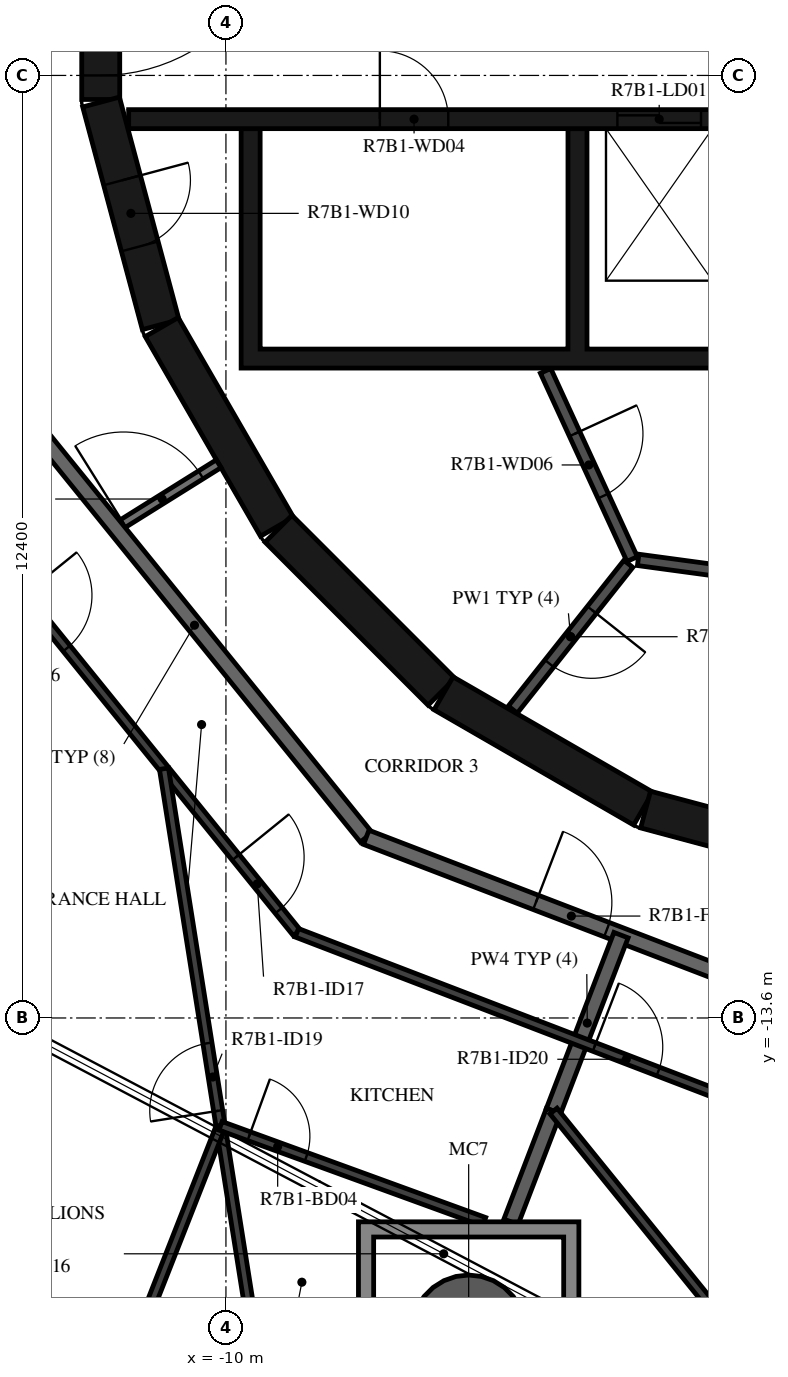
"""IFC4 building model, lengths in metres.
Left out: names, types, materials, properties, quantities, classifications, styles, units other than length and angle.
Written with IfcOpenShell. Run it as: python <this file> out.ifc"""

import sys

from ifc_helpers import new_model, si_unit, direction, frame, frame_2d, origin, origin_2d, place, context, subcontext, project, spatial, polyline, rectangle, hollow_circle, outline, extrude, element, fill, save


model = new_model("IFC4")
c1 = context("Model", 3, precision=1e-05, world=origin(), true_north=direction((0.0, 1.0)))
c2 = subcontext(c1, "Body", "Model", "MODEL_VIEW")
j1 = project(units=[si_unit("LENGTHUNIT", "METRE"), si_unit("PLANEANGLEUNIT", "RADIAN")], contexts=[c1])
p1 = place(None, origin())
s1 = spatial("IfcSite", under=j1, at=p1, CompositionType="ELEMENT")
p2 = place(p1, origin())
s2 = spatial("IfcBuilding", under=s1, at=p2, CompositionType="ELEMENT")
p3 = place(p2, frame((0.0, 0.0, 273.9)))
s3 = spatial("IfcBuildingStorey", under=s2, at=p3, CompositionType="ELEMENT", Elevation=273.9)
p4 = place(p3, frame((-6.807, -17.732, -0.38), z_axis=(0.0, 0.0, 1.0), x_axis=(1.0, 0.0, 0.0)))
e1 = element("IfcColumn", 1, at=p4, inside=s3, PredefinedType="COLUMN", context=c2, shape_type="SweptSolid", body=[
    extrude(hollow_circle(Radius=0.75, WallThickness=0.035, at=origin_2d()), origin(), (0.0, 0.0, 1.0), 3.5),
])
p5 = place(p3, frame((-11.647, 1.516, 0.0), z_axis=(0.0, 0.0, 1.0), x_axis=(0.0, -1.0, 0.0)))
e2 = element("IfcWall", 2, at=p5, inside=s3, PredefinedType="SHEAR", context=c2, shape_type="SweptSolid", body=[
    extrude(rectangle(XDim=3.033, YDim=0.5, at=frame_2d((1.516, 0.0))), origin(), (0.0, 0.0, 1.0), 3.12),
])
p6 = place(p5, frame((0.316, 0.0, 0.0)))
e3 = element("IfcOpeningElement", 3, at=p6, cuts=e2, PredefinedType="OPENING", context=c2, shape_type="SweptSolid", body=[
    extrude(rectangle(XDim=2.4, YDim=2.1, at=frame_2d((1.2, 1.05))), frame((0.0, 0.26, 0.0), z_axis=(0.0, -1.0, 0.0), x_axis=(1.0, 0.0, 0.0)), (0.0, 0.0, 1.0), 0.52),
])
p7 = place(p3, frame((-11.643, -1.55, 0.0), z_axis=(0.0, 0.0, 1.0), x_axis=(0.258734743916, -0.965948410781, 0.0)))
e4 = element("IfcWall", 4, at=p7, inside=s3, PredefinedType="SHEAR", context=c2, shape_type="SweptSolid", body=[
    extrude(rectangle(XDim=3.033, YDim=0.5, at=frame_2d((1.516, 0.0))), origin(), (0.0, 0.0, 1.0), 3.12),
])
p8 = place(p7, frame((1.066, 0.0, 0.0)))
e5 = element("IfcOpeningElement", 5, at=p8, cuts=e4, PredefinedType="OPENING", context=c2, shape_type="SweptSolid", body=[
    extrude(rectangle(XDim=0.9, YDim=2.1, at=frame_2d((0.45, 1.05))), frame((0.0, 0.26, 0.0), z_axis=(0.0, -1.0, 0.0), x_axis=(1.0, 0.0, 0.0)), (0.0, 0.0, 1.0), 0.52),
])
p9 = place(p3, frame((-10.845, -4.51, 0.0), z_axis=(0.0, 0.0, 1.0), x_axis=(0.500087131594, -0.865975092491, 0.0)))
e6 = element("IfcWall", 6, at=p9, inside=s3, PredefinedType="SHEAR", context=c2, shape_type="SweptSolid", body=[
    extrude(rectangle(XDim=3.033, YDim=0.5, at=frame_2d((1.516, 0.0))), origin(), (0.0, 0.0, 1.0), 3.12),
])
p10 = place(p3, frame((-9.308, -7.164, 0.0), z_axis=(0.0, 0.0, 1.0), x_axis=(0.707106781187, -0.707106781187, 0.0)))
e7 = element("IfcWall", 7, at=p10, inside=s3, PredefinedType="SHEAR", context=c2, shape_type="SweptSolid", body=[
    extrude(rectangle(XDim=3.032, YDim=0.5, at=frame_2d((1.516, 0.0))), origin(), (0.0, 0.0, 1.0), 3.12),
])
for number, where, z_axis, x_axis in (
    (8, (-7.137, -9.329, 0.0), (0.0, 0.0, 1.0), (0.866, -0.5, 0.0)),
    (9, (-4.479, -10.858, 0.0), (0.0, 0.0, 1.0), (0.966, -0.259, 0.0)),
):
    element("IfcWall", number, at=place(p3, frame(where, z_axis=z_axis, x_axis=x_axis)), inside=s3, PredefinedType="SHEAR", context=c2, shape_type="SweptSolid", body=[
        extrude(rectangle(XDim=3.033, YDim=0.5, at=frame_2d((1.516, 0.0))), origin(), (0.0, 0.0, 1.0), 3.12),
    ])
p11 = place(p3, origin())
e10 = element("IfcWall", 10, at=p11, inside=s3, PredefinedType="SHEAR", context=c2, shape_type="SweptSolid", body=[
    extrude(outline(polyline([(9.8, -5.05), (9.8, -4.8), (9.8, -1.9), (9.55, -1.9), (9.55, -4.8), (7.65, -4.8), (7.65, -1.9), (7.4, -1.9), (7.4, -4.8), (5.5, -4.8), (5.5, -1.9), (5.25, -1.9), (5.25, -4.8), (3.35, -4.8), (3.35, -1.9), (3.1, -1.9), (3.1, -4.8), (1.2, -4.8), (1.2, -1.9), (0.95, -1.9), (0.95, -4.8), (-0.95, -4.8), (-0.95, -1.9), (-1.2, -1.9), (-1.2, -4.8), (-3.1, -4.8), (-3.1, -1.9), (-3.35, -1.9), (-3.35, -4.8), (-5.25, -4.8), (-5.25, -1.9), (-5.5, -1.9), (-5.5, -4.8), (-9.55, -4.8), (-9.55, -1.9), (-9.8, -1.9), (-9.8, -4.8), (-9.8, -5.05), (9.8, -5.05)])), origin(), (0.0, 0.0, 1.0), 3.12),
])
p12 = place(p3, frame((-11.28, -1.775, 0.0), z_axis=(0.0, 0.0, 1.0), x_axis=(1.0, 0.0, 0.0)))
e11 = element("IfcWall", 11, at=p12, inside=s3, PredefinedType="SHEAR", context=c2, shape_type="SweptSolid", body=[
    extrude(rectangle(XDim=14.38, YDim=0.25, at=frame_2d((7.19, 0.0))), origin(), (0.0, 0.0, 1.0), 3.12),
])
p13 = place(p12, frame((6.43, 0.0, 0.0)))
e12 = element("IfcOpeningElement", 12, at=p13, cuts=e11, PredefinedType="OPENING", context=c2, shape_type="SweptSolid", body=[
    extrude(rectangle(XDim=1.1, YDim=2.1, at=frame_2d((0.55, 1.05))), frame((0.0, 0.135, 0.0), z_axis=(0.0, -1.0, 0.0), x_axis=(1.0, 0.0, 0.0)), (0.0, 0.0, 1.0), 0.27),
])
p14 = place(p12, frame((8.58, 0.0, 0.0)))
e13 = element("IfcOpeningElement", 13, at=p14, cuts=e11, PredefinedType="OPENING", context=c2, shape_type="SweptSolid", body=[
    extrude(rectangle(XDim=1.1, YDim=2.1, at=frame_2d((0.55, 1.05))), frame((0.0, 0.135, 0.0), z_axis=(0.0, -1.0, 0.0), x_axis=(1.0, 0.0, 0.0)), (0.0, 0.0, 1.0), 0.27),
])
p15 = place(p12, frame((10.73, 0.0, 0.0)))
e14 = element("IfcOpeningElement", 14, at=p15, cuts=e11, PredefinedType="OPENING", context=c2, shape_type="SweptSolid", body=[
    extrude(rectangle(XDim=1.1, YDim=2.1, at=frame_2d((0.55, 1.05))), frame((0.0, 0.135, 0.0), z_axis=(0.0, -1.0, 0.0), x_axis=(1.0, 0.0, 0.0)), (0.0, 0.0, 1.0), 0.27),
])
p16 = place(p12, frame((3.305, 0.0, 0.0)))
e15 = element("IfcOpeningElement", 15, at=p16, cuts=e11, PredefinedType="OPENING", context=c2, shape_type="SweptSolid", body=[
    extrude(rectangle(XDim=0.9, YDim=2.1, at=frame_2d((0.45, 1.05))), frame((0.0, 0.135, 0.0), z_axis=(0.0, -1.0, 0.0), x_axis=(1.0, 0.0, 0.0)), (0.0, 0.0, 1.0), 0.27),
])
p17 = place(p12, frame((12.98, 0.0, 0.0)))
e16 = element("IfcOpeningElement", 16, at=p17, cuts=e11, PredefinedType="OPENING", context=c2, shape_type="SweptSolid", body=[
    extrude(rectangle(XDim=0.9, YDim=2.1, at=frame_2d((0.45, 1.05))), frame((0.0, 0.135, 0.0), z_axis=(0.0, -1.0, 0.0), x_axis=(1.0, 0.0, 0.0)), (0.0, 0.0, 1.0), 0.27),
])
p18 = place(p3, frame((-5.795, -5.086, 0.0), z_axis=(0.0, 0.0, 1.0), x_axis=(0.417887867606, -0.908498613157, 0.0)))
e17 = element("IfcWall", 17, at=p18, inside=s3, PredefinedType="PARTITIONING", context=c2, shape_type="SweptSolid", body=[
    extrude(rectangle(XDim=2.726, YDim=0.15, at=frame_2d((1.363, 0.0))), origin(), (0.0, 0.0, 1.0), 3.12),
])
p19 = place(p18, frame((0.913, 0.0, 0.0)))
e18 = element("IfcOpeningElement", 18, at=p19, cuts=e17, PredefinedType="OPENING", context=c2, shape_type="SweptSolid", body=[
    extrude(rectangle(XDim=0.9, YDim=2.1, at=frame_2d((0.45, 1.05))), frame((0.0, 0.085, 0.0), z_axis=(0.0, -1.0, 0.0), x_axis=(1.0, 0.0, 0.0)), (0.0, 0.0, 1.0), 0.17),
])
p20 = place(p3, frame((-4.706, -7.625, 0.0), z_axis=(0.0, 0.0, 1.0), x_axis=(-0.621392599334, -0.783499353856, 0.0)))
e19 = element("IfcWall", 19, at=p20, inside=s3, PredefinedType="PARTITIONING", context=c2, shape_type="SweptSolid", body=[
    extrude(rectangle(XDim=2.447, YDim=0.15, at=frame_2d((1.224, 0.0))), origin(), (0.0, 0.0, 1.0), 3.12),
])
p21 = place(p20, frame((0.774, 0.0, 0.0)))
e20 = element("IfcOpeningElement", 20, at=p21, cuts=e19, PredefinedType="OPENING", context=c2, shape_type="SweptSolid", body=[
    extrude(rectangle(XDim=0.9, YDim=2.1, at=frame_2d((0.45, 1.05))), frame((0.0, 0.085, 0.0), z_axis=(0.0, -1.0, 0.0), x_axis=(1.0, 0.0, 0.0)), (0.0, 0.0, 1.0), 0.17),
])
p22 = place(p3, frame((-2.42, -7.865, 0.0), z_axis=(0.0, 0.0, 1.0), x_axis=(-0.990972299108, 0.134066783362, 0.0)))
e21 = element("IfcWall", 21, at=p22, inside=s3, PredefinedType="PARTITIONING", context=c2, shape_type="SweptSolid", body=[
    extrude(rectangle(XDim=2.176, YDim=0.15, at=frame_2d((1.088, 0.0))), origin(), (0.0, 0.0, 1.0), 3.12),
])
p23 = place(p3, frame((-11.449, -7.154, 0.0), z_axis=(0.0, 0.0, 1.0), x_axis=(0.848067047543, 0.529888934468, 0.0)))
e22 = element("IfcWall", 22, at=p23, inside=s3, PredefinedType="PARTITIONING", context=c2, shape_type="SweptSolid", body=[
    extrude(rectangle(XDim=1.596, YDim=0.12, at=frame_2d((0.798, 0.0))), origin(), (0.0, 0.0, 1.0), 3.12),
])
p24 = place(p23, frame((0.12, 0.0, 0.0)))
e23 = element("IfcOpeningElement", 23, at=p24, cuts=e22, PredefinedType="OPENING", context=c2, shape_type="SweptSolid", body=[
    extrude(rectangle(XDim=1.2, YDim=2.1, at=frame_2d((0.6, 1.05))), frame((0.0, 0.07, 0.0), z_axis=(0.0, -1.0, 0.0), x_axis=(1.0, 0.0, 0.0)), (0.0, 0.0, 1.0), 0.14),
])
p25 = place(p3, frame((-12.673, -5.643, 0.0), z_axis=(0.0, 0.0, 1.0), x_axis=(0.629302871585, -0.777160148113, 0.0)))
e24 = element("IfcWall", 24, at=p25, inside=s3, PredefinedType="STANDARD", context=c2, shape_type="SweptSolid", body=[
    extrude(rectangle(XDim=7.181, YDim=0.2, at=frame_2d((3.59, 0.0))), origin(), (0.0, 0.0, 1.0), 3.12),
])
p26 = place(p3, frame((-8.154, -11.223, 0.0), z_axis=(0.0, 0.0, 1.0), x_axis=(0.93359073609, -0.358341090983, 0.0)))
e25 = element("IfcWall", 25, at=p26, inside=s3, PredefinedType="STANDARD", context=c2, shape_type="SweptSolid", body=[
    extrude(rectangle(XDim=7.181, YDim=0.2, at=frame_2d((3.59, 0.0))), origin(), (0.0, 0.0, 1.0), 3.12),
])
p27 = place(p26, frame((2.39, 0.0, 0.0)))
e26 = element("IfcOpeningElement", 26, at=p27, cuts=e25, PredefinedType="OPENING", context=c2, shape_type="SweptSolid", body=[
    extrude(rectangle(XDim=1.0, YDim=2.1, at=frame_2d((0.5, 1.05))), frame((0.0, 0.11, 0.0), z_axis=(0.0, -1.0, 0.0), x_axis=(1.0, 0.0, 0.0)), (0.0, 0.0, 1.0), 0.22),
])
p28 = place(p3, frame((-5.69, -14.824, 0.0), z_axis=(0.0, 0.0, 1.0), x_axis=(0.358345342952, 0.933589104041, 0.0)))
e27 = element("IfcWall", 27, at=p28, inside=s3, PredefinedType="STANDARD", context=c2, shape_type="SweptSolid", body=[
    extrude(rectangle(XDim=2.479, YDim=0.2, at=frame_2d((1.239, 0.0))), origin(), (0.0, 0.0, 1.0), 3.12),
])
p29 = place(p3, frame((-6.25, -16.282, 0.0), z_axis=(0.0, 0.0, 1.0), x_axis=(0.358360842469, 0.933583154617, 0.0)))
e28 = element("IfcWall", 28, at=p29, inside=s3, PredefinedType="STANDARD", context=c2, shape_type="SweptSolid", body=[
    extrude(rectangle(XDim=1.562, YDim=0.2, at=frame_2d((0.781, 0.0))), origin(), (0.0, 0.0, 1.0), 3.12),
])
p30 = place(p3, frame((-12.788, -7.884, 0.0), z_axis=(0.0, 0.0, 1.0), x_axis=(0.6293312414, -0.777137174891, 0.0)))
e29 = element("IfcWall", 29, at=p30, inside=s3, PredefinedType="PARTITIONING", context=c2, shape_type="SweptSolid", body=[
    extrude(rectangle(XDim=5.913, YDim=0.12, at=frame_2d((2.957, 0.0))), origin(), (0.0, 0.0, 1.0), 3.12),
])
p31 = place(p30, frame((0.2, 0.0, 0.0)))
e30 = element("IfcOpeningElement", 30, at=p31, cuts=e29, PredefinedType="OPENING", context=c2, shape_type="SweptSolid", body=[
    extrude(rectangle(XDim=0.9, YDim=2.1, at=frame_2d((0.45, 1.05))), frame((0.0, 0.07, 0.0), z_axis=(0.0, -1.0, 0.0), x_axis=(1.0, 0.0, 0.0)), (0.0, 0.0, 1.0), 0.14),
])
p32 = place(p30, frame((4.635, 0.0, 0.0)))
e31 = element("IfcOpeningElement", 31, at=p32, cuts=e29, PredefinedType="OPENING", context=c2, shape_type="SweptSolid", body=[
    extrude(rectangle(XDim=0.9, YDim=2.1, at=frame_2d((0.45, 1.05))), frame((0.0, 0.07, 0.0), z_axis=(0.0, -1.0, 0.0), x_axis=(1.0, 0.0, 0.0)), (0.0, 0.0, 1.0), 0.14),
])
p33 = place(p3, frame((-9.067, -12.479, 0.0), z_axis=(0.0, 0.0, 1.0), x_axis=(0.933579449035, -0.358370495911, 0.0)))
e32 = element("IfcWall", 32, at=p33, inside=s3, PredefinedType="PARTITIONING", context=c2, shape_type="SweptSolid", body=[
    extrude(rectangle(XDim=7.985, YDim=0.12, at=frame_2d((3.992, 0.0))), origin(), (0.0, 0.0, 1.0), 3.12),
])
p34 = place(p33, frame((4.192, 0.0, 0.0)))
e33 = element("IfcOpeningElement", 33, at=p34, cuts=e32, PredefinedType="OPENING", context=c2, shape_type="SweptSolid", body=[
    extrude(rectangle(XDim=0.9, YDim=2.1, at=frame_2d((0.45, 1.05))), frame((0.0, 0.07, 0.0), z_axis=(0.0, -1.0, 0.0), x_axis=(1.0, 0.0, 0.0)), (0.0, 0.0, 1.0), 0.14),
])
p35 = place(p3, frame((-9.619, -17.871, 0.0), z_axis=(0.0, 0.0, 1.0), x_axis=(-0.156433255633, 0.987688532146, 0.0)))
e34 = element("IfcWall", 34, at=p35, inside=s3, PredefinedType="PARTITIONING", context=c2, shape_type="SweptSolid", body=[
    extrude(rectangle(XDim=7.644, YDim=0.12, at=frame_2d((3.822, 0.0))), origin(), (0.0, 0.0, 1.0), 3.12),
])
p36 = place(p35, frame((3.087, 0.0, 0.0)))
e35 = element("IfcOpeningElement", 35, at=p36, cuts=e34, PredefinedType="OPENING", context=c2, shape_type="SweptSolid", body=[
    extrude(rectangle(XDim=0.9, YDim=2.1, at=frame_2d((0.45, 1.05))), frame((0.0, 0.07, 0.0), z_axis=(0.0, -1.0, 0.0), x_axis=(1.0, 0.0, 0.0)), (0.0, 0.0, 1.0), 0.14),
])
p37 = place(p3, frame((-13.067, -22.658, 0.0), z_axis=(0.0, 0.0, 1.0), x_axis=(0.365785999331, 0.930698986082, 0.0)))
e36 = element("IfcWall", 36, at=p37, inside=s3, PredefinedType="PARTITIONING", context=c2, shape_type="SweptSolid", body=[
    extrude(rectangle(XDim=8.196, YDim=0.12, at=frame_2d((4.098, 0.0))), origin(), (0.0, 0.0, 1.0), 3.12),
])
p38 = place(p37, frame((0.5, 0.0, 0.0)))
e37 = element("IfcOpeningElement", 37, at=p38, cuts=e36, PredefinedType="OPENING", context=c2, shape_type="SweptSolid", body=[
    extrude(rectangle(XDim=0.9, YDim=2.1, at=frame_2d((0.45, 1.05))), frame((0.0, 0.07, 0.0), z_axis=(0.0, -1.0, 0.0), x_axis=(1.0, 0.0, 0.0)), (0.0, 0.0, 1.0), 0.14),
])
p39 = place(p3, frame((-10.071, -15.019, 0.0), z_axis=(0.0, 0.0, 1.0), x_axis=(0.939648507355, -0.34214131967, 0.0)))
e38 = element("IfcWall", 38, at=p39, inside=s3, PredefinedType="PARTITIONING", context=c2, shape_type="SweptSolid", body=[
    extrude(rectangle(XDim=3.691, YDim=0.12, at=frame_2d((1.846, 0.0))), origin(), (0.0, 0.0, 1.0), 3.12),
])
p40 = place(p39, frame((0.4, 0.0, 0.0)))
e39 = element("IfcOpeningElement", 39, at=p40, cuts=e38, PredefinedType="OPENING", context=c2, shape_type="SweptSolid", body=[
    extrude(rectangle(XDim=0.8, YDim=2.1, at=frame_2d((0.4, 1.05))), frame((0.0, 0.07, 0.0), z_axis=(0.0, -1.0, 0.0), x_axis=(1.0, 0.0, 0.0)), (0.0, 0.0, 1.0), 0.14),
])
p41 = place(p3, frame((-4.809, -19.717, 0.0), z_axis=(0.0, 0.0, 1.0), x_axis=(0.777140730041, 0.629326851255, 0.0)))
e40 = element("IfcWall", 40, at=p41, inside=s3, PredefinedType="PARTITIONING", context=c2, shape_type="SweptSolid", body=[
    extrude(rectangle(XDim=7.644, YDim=0.12, at=frame_2d((3.822, 0.0))), origin(), (0.0, 0.0, 1.0), 3.12),
])
p42 = place(p41, frame((2.594, 0.0, 0.0)))
e41 = element("IfcOpeningElement", 41, at=p42, cuts=e40, PredefinedType="OPENING", context=c2, shape_type="SweptSolid", body=[
    extrude(rectangle(XDim=0.9, YDim=2.1, at=frame_2d((0.45, 1.05))), frame((0.0, 0.07, 0.0), z_axis=(0.0, -1.0, 0.0), x_axis=(1.0, 0.0, 0.0)), (0.0, 0.0, 1.0), 0.14),
])
p43 = place(p41, frame((0.3, 0.0, 0.0)))
e42 = element("IfcOpeningElement", 42, at=p43, cuts=e40, PredefinedType="OPENING", context=c2, shape_type="SweptSolid", body=[
    extrude(rectangle(XDim=0.8, YDim=2.1, at=frame_2d((0.4, 1.05))), frame((0.0, 0.07, 0.0), z_axis=(0.0, -1.0, 0.0), x_axis=(1.0, 0.0, 0.0)), (0.0, 0.0, 1.0), 0.14),
])
p44 = place(p41, frame((4.319, 0.0, 0.0)))
e43 = element("IfcOpeningElement", 43, at=p44, cuts=e40, PredefinedType="OPENING", context=c2, shape_type="SweptSolid", body=[
    extrude(rectangle(XDim=0.9, YDim=2.1, at=frame_2d((0.45, 1.05))), frame((0.0, 0.07, 0.0), z_axis=(0.0, -1.0, 0.0), x_axis=(1.0, 0.0, 0.0)), (0.0, 0.0, 1.0), 0.14),
])
p45 = place(p3, frame((-2.948, -18.21, 0.0), z_axis=(0.0, 0.0, 1.0), x_axis=(-0.629330389268, 0.777137864953, 0.0)))
e44 = element("IfcWall", 44, at=p45, inside=s3, PredefinedType="PARTITIONING", context=c2, shape_type="SweptSolid", body=[
    extrude(rectangle(XDim=4.357, YDim=0.12, at=frame_2d((2.179, 0.0))), origin(), (0.0, 0.0, 1.0), 3.12),
])
p46 = place(p3, origin())
e45 = element("IfcWall", 45, at=p46, inside=s3, PredefinedType="STANDARD", context=c2, shape_type="SweptSolid", body=[
    extrude(outline(polyline([(-5.357, -16.282), (-5.357, -19.182), (-8.257, -19.182), (-8.257, -16.282), (-5.357, -16.282)]), holes=[polyline([(-8.057, -18.982), (-5.557, -18.982), (-5.557, -16.482), (-8.057, -16.482), (-8.057, -18.982)])]), origin(), (0.0, 0.0, 1.0), 3.12),
])
p47 = place(p6, origin())
e46 = element("IfcDoor", 46, at=p47, inside=s3, OperationType="DOUBLE_DOOR_SINGLE_SWING", PredefinedType="DOOR", context=c2, shape_type="SweptSolid", body=[
    extrude(rectangle(XDim=2.4, YDim=2.1, at=frame_2d((1.2, 1.05))), frame((0.0, 0.025, 0.0), z_axis=(0.0, -1.0, 0.0), x_axis=(1.0, 0.0, 0.0)), (0.0, 0.0, 1.0), 0.05),
])
fill(e3, e46)
p48 = place(p13, origin())
e47 = element("IfcDoor", 47, at=p48, inside=s3, OperationType="DOUBLE_DOOR_SLIDING", PredefinedType="DOOR", context=c2, shape_type="SweptSolid", body=[
    extrude(rectangle(XDim=1.1, YDim=2.1, at=frame_2d((0.55, 1.05))), frame((0.0, 0.025, 0.0), z_axis=(0.0, -1.0, 0.0), x_axis=(1.0, 0.0, 0.0)), (0.0, 0.0, 1.0), 0.05),
])
fill(e12, e47)
p49 = place(p16, origin())
e48 = element("IfcDoor", 48, at=p49, inside=s3, OperationType="SINGLE_SWING_RIGHT", PredefinedType="DOOR", context=c2, shape_type="SweptSolid", body=[
    extrude(rectangle(XDim=0.9, YDim=2.1, at=frame_2d((0.45, 1.05))), frame((0.0, 0.025, 0.0), z_axis=(0.0, -1.0, 0.0), x_axis=(1.0, 0.0, 0.0)), (0.0, 0.0, 1.0), 0.05),
])
fill(e15, e48)
p50 = place(p19, origin())
e49 = element("IfcDoor", 49, at=p50, inside=s3, OperationType="SINGLE_SWING_RIGHT", PredefinedType="DOOR", context=c2, shape_type="SweptSolid", body=[
    extrude(rectangle(XDim=0.9, YDim=2.1, at=frame_2d((0.45, 1.05))), frame((0.0, 0.025, 0.0), z_axis=(0.0, -1.0, 0.0), x_axis=(1.0, 0.0, 0.0)), (0.0, 0.0, 1.0), 0.05),
])
fill(e18, e49)
p51 = place(p21, origin())
e50 = element("IfcDoor", 50, at=p51, inside=s3, OperationType="SINGLE_SWING_LEFT", PredefinedType="DOOR", context=c2, shape_type="SweptSolid", body=[
    extrude(rectangle(XDim=0.9, YDim=2.1, at=frame_2d((0.45, 1.05))), frame((0.0, 0.025, 0.0), z_axis=(0.0, -1.0, 0.0), x_axis=(1.0, 0.0, 0.0)), (0.0, 0.0, 1.0), 0.05),
])
fill(e20, e50)
p52 = place(p8, origin())
e51 = element("IfcDoor", 51, at=p52, inside=s3, OperationType="SINGLE_SWING_RIGHT", PredefinedType="DOOR", context=c2, shape_type="SweptSolid", body=[
    extrude(rectangle(XDim=0.9, YDim=2.1, at=frame_2d((0.45, 1.05))), frame((0.0, 0.025, 0.0), z_axis=(0.0, -1.0, 0.0), x_axis=(1.0, 0.0, 0.0)), (0.0, 0.0, 1.0), 0.05),
])
fill(e5, e51)
p53 = place(p27, origin())
e52 = element("IfcDoor", 52, at=p53, inside=s3, OperationType="SINGLE_SWING_RIGHT", PredefinedType="DOOR", context=c2, shape_type="SweptSolid", body=[
    extrude(rectangle(XDim=1.0, YDim=2.1, at=frame_2d((0.5, 1.05))), frame((0.0, 0.025, 0.0), z_axis=(0.0, -1.0, 0.0), x_axis=(1.0, 0.0, 0.0)), (0.0, 0.0, 1.0), 0.05),
])
fill(e26, e52)
p54 = place(p31, origin())
e53 = element("IfcDoor", 53, at=p54, inside=s3, OperationType="SINGLE_SWING_RIGHT", PredefinedType="DOOR", context=c2, shape_type="SweptSolid", body=[
    extrude(rectangle(XDim=0.9, YDim=2.1, at=frame_2d((0.45, 1.05))), frame((0.0, 0.025, 0.0), z_axis=(0.0, -1.0, 0.0), x_axis=(1.0, 0.0, 0.0)), (0.0, 0.0, 1.0), 0.05),
])
fill(e30, e53)
p55 = place(p32, origin())
e54 = element("IfcDoor", 54, at=p55, inside=s3, OperationType="SINGLE_SWING_RIGHT", PredefinedType="DOOR", context=c2, shape_type="SweptSolid", body=[
    extrude(rectangle(XDim=0.9, YDim=2.1, at=frame_2d((0.45, 1.05))), frame((0.0, 0.025, 0.0), z_axis=(0.0, -1.0, 0.0), x_axis=(1.0, 0.0, 0.0)), (0.0, 0.0, 1.0), 0.05),
])
fill(e31, e54)
p56 = place(p40, origin())
e55 = element("IfcDoor", 55, at=p56, inside=s3, OperationType="SINGLE_SWING_RIGHT", PredefinedType="DOOR", context=c2, shape_type="SweptSolid", body=[
    extrude(rectangle(XDim=0.8, YDim=2.1, at=frame_2d((0.4, 1.05))), frame((0.0, 0.025, 0.0), z_axis=(0.0, -1.0, 0.0), x_axis=(1.0, 0.0, 0.0)), (0.0, 0.0, 1.0), 0.05),
])
fill(e39, e55)
p57 = place(p36, origin())
e56 = element("IfcDoor", 56, at=p57, inside=s3, OperationType="SINGLE_SWING_LEFT", PredefinedType="DOOR", context=c2, shape_type="SweptSolid", body=[
    extrude(rectangle(XDim=0.9, YDim=2.1, at=frame_2d((0.45, 1.05))), frame((0.0, 0.025, 0.0), z_axis=(0.0, -1.0, 0.0), x_axis=(1.0, 0.0, 0.0)), (0.0, 0.0, 1.0), 0.05),
])
fill(e35, e56)
p58 = place(p34, origin())
e57 = element("IfcDoor", 57, at=p58, inside=s3, OperationType="SINGLE_SWING_RIGHT", PredefinedType="DOOR", context=c2, shape_type="SweptSolid", body=[
    extrude(rectangle(XDim=0.9, YDim=2.1, at=frame_2d((0.45, 1.05))), frame((0.0, 0.025, 0.0), z_axis=(0.0, -1.0, 0.0), x_axis=(1.0, 0.0, 0.0)), (0.0, 0.0, 1.0), 0.05),
])
fill(e33, e57)
p59 = place(p24, origin())
e58 = element("IfcDoor", 58, at=p59, inside=s3, OperationType="DOUBLE_DOOR_SINGLE_SWING", PredefinedType="DOOR", context=c2, shape_type="SweptSolid", body=[
    extrude(rectangle(XDim=1.2, YDim=2.1, at=frame_2d((0.6, 1.05))), frame((0.0, 0.025, 0.0), z_axis=(0.0, -1.0, 0.0), x_axis=(1.0, 0.0, 0.0)), (0.0, 0.0, 1.0), 0.05),
])
fill(e23, e58)
save(model, sys.argv[1])
